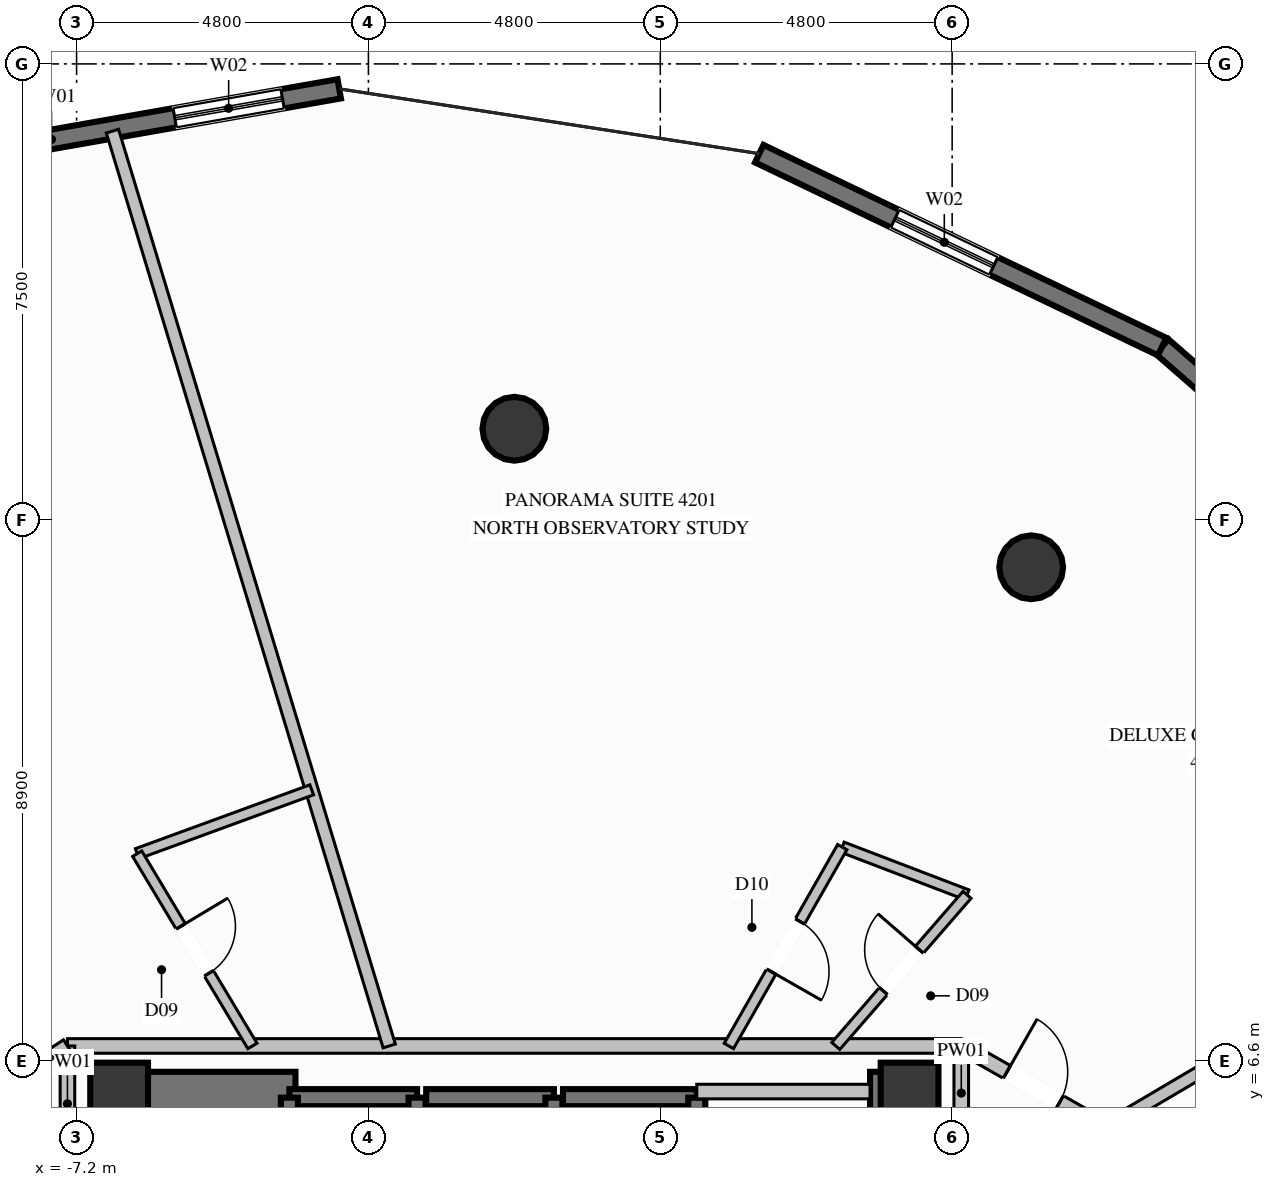
"""IFC4 building model, lengths in metres.
Left out: names, types, materials, properties, quantities, classifications, styles, units other than length and angle.
Written with IfcOpenShell. Run it as: python <this file> out.ifc"""

import sys

from ifc_helpers import new_model, si_unit, direction, frame, frame_2d, origin, origin_2d, place, context, subcontext, project, spatial, rectangle, circle, extrude, element, fill, save


model = new_model("IFC4")
c1 = context("Model", 3, precision=1e-05, world=origin(), true_north=direction((0.0, 1.0)))
c2 = subcontext(c1, "Body", "Model", "MODEL_VIEW")
j1 = project(units=[si_unit("LENGTHUNIT", "METRE"), si_unit("PLANEANGLEUNIT", "RADIAN")], contexts=[c1])
p1 = place(None, origin())
s1 = spatial("IfcSite", under=j1, at=p1, CompositionType="ELEMENT")
p2 = place(p1, origin())
s2 = spatial("IfcBuilding", under=s1, at=p2, CompositionType="ELEMENT")
p3 = place(p2, frame((0.0, 0.0, 156.6)))
s3 = spatial("IfcBuildingStorey", under=s2, at=p3, CompositionType="ELEMENT", Elevation=156.6)
for number, where, z_axis, x_axis in (
    (1, (6.5, 6.1, 0.0), (0.0, 0.0, 1.0), (1.0, 0.0, 0.0)),
    (2, (-6.5, 6.1, 0.0), (0.0, 0.0, 1.0), (1.0, 0.0, 0.0)),
):
    element("IfcColumn", number, at=place(p3, frame(where, z_axis=z_axis, x_axis=x_axis)), inside=s3, PredefinedType="COLUMN", context=c2, shape_type="SweptSolid", body=[
        extrude(rectangle(XDim=0.95, YDim=0.95, at=origin_2d()), origin(), (0.0, 0.0, 1.0), 3.6),
    ])
p4 = place(p3, frame((-6.175, 6.1, 0.0), z_axis=(0.0, 0.0, 1.0), x_axis=(1.0, 0.0, 0.0)))
e3 = element("IfcWall", 3, at=p4, inside=s3, PredefinedType="SHEAR", context=c2, shape_type="SweptSolid", body=[
    extrude(rectangle(XDim=2.575, YDim=0.65, at=frame_2d((1.288, 0.0))), origin(), (0.0, 0.0, 1.0), 3.6),
])
p5 = place(p3, frame((5.85, 6.1, 0.0), z_axis=(0.0, 0.0, 1.0), x_axis=(1.0, 0.0, 0.0)))
e4 = element("IfcWall", 4, at=p5, inside=s3, PredefinedType="SHEAR", context=c2, shape_type="SweptSolid", body=[
    extrude(rectangle(XDim=0.325, YDim=0.65, at=frame_2d((0.163, 0.0))), origin(), (0.0, 0.0, 1.0), 3.6),
])
p6 = place(p3, frame((-6.5, 2.35, 0.0), z_axis=(0.0, 0.0, 1.0), x_axis=(0.0, 1.0, 0.0)))
e5 = element("IfcWall", 5, at=p6, inside=s3, PredefinedType="SHEAR", context=c2, shape_type="SweptSolid", body=[
    extrude(rectangle(XDim=4.075, YDim=0.65, at=frame_2d((2.038, 0.0))), origin(), (0.0, 0.0, 1.0), 3.6),
])
p7 = place(p3, frame((6.5, 3.35, 0.0), z_axis=(0.0, 0.0, 1.0), x_axis=(0.0, 1.0, 0.0)))
e6 = element("IfcWall", 6, at=p7, inside=s3, PredefinedType="SHEAR", context=c2, shape_type="SweptSolid", body=[
    extrude(rectangle(XDim=3.075, YDim=0.65, at=frame_2d((1.538, 0.0))), origin(), (0.0, 0.0, 1.0), 3.6),
])
for number, where, z_axis, x_axis in (
    (7, (8.5, 14.722, 0.0), (0.0, 0.0, 1.0), (1.0, 0.0, 0.0)),
    (8, (0.0, 17.0, 0.0), (0.0, 0.0, 1.0), (1.0, 0.0, 0.0)),
):
    element("IfcColumn", number, at=place(p3, frame(where, z_axis=z_axis, x_axis=x_axis)), inside=s3, PredefinedType="COLUMN", context=c2, shape_type="SweptSolid", body=[
        extrude(circle(Radius=0.525, at=origin_2d()), origin(), (0.0, 0.0, 1.0), 3.6),
    ])
p8 = place(p3, frame((10.653, 18.351, 0.0), z_axis=(0.0, 0.0, 1.0), x_axis=(0.753498250632, -0.657449911624, 0.0)))
e9 = element("IfcWall", 9, at=p8, inside=s3, PredefinedType="SOLIDWALL", context=c2, shape_type="SweptSolid", body=[
    extrude(rectangle(XDim=7.56, YDim=0.32, at=frame_2d((3.78, 0.0))), origin(), (0.0, 0.0, 1.0), 3.35),
])
p9 = place(p8, frame((3.03, 0.0, 0.85)))
e10 = element("IfcOpeningElement", 10, at=p9, cuts=e9, PredefinedType="OPENING", context=c2, shape_type="SweptSolid", body=[
    extrude(rectangle(XDim=1.5, YDim=1.2, at=frame_2d((0.75, 0.6))), frame((0.0, 0.17, 0.0), z_axis=(0.0, -1.0, 0.0), x_axis=(1.0, 0.0, 0.0)), (0.0, 0.0, 1.0), 0.34),
])
p10 = place(p3, frame((4.028, 21.524, 0.0), z_axis=(0.0, 0.0, 1.0), x_axis=(0.901902357259, -0.431939970332, 0.0)))
e11 = element("IfcWall", 11, at=p10, inside=s3, PredefinedType="SOLIDWALL", context=c2, shape_type="SweptSolid", body=[
    extrude(rectangle(XDim=7.346, YDim=0.32, at=frame_2d((3.673, 0.0))), origin(), (0.0, 0.0, 1.0), 3.35),
])
p11 = place(p10, frame((2.474, 0.0, 0.35)))
e12 = element("IfcOpeningElement", 12, at=p11, cuts=e11, PredefinedType="OPENING", context=c2, shape_type="SweptSolid", body=[
    extrude(rectangle(XDim=1.8, YDim=2.6, at=frame_2d((0.9, 1.3))), frame((0.0, 0.17, 0.0), z_axis=(0.0, -1.0, 0.0), x_axis=(1.0, 0.0, 0.0)), (0.0, 0.0, 1.0), 0.34),
])
p12 = place(p3, frame((-9.393, 21.445, 0.0), z_axis=(0.0, 0.0, 1.0), x_axis=(0.984896334406, 0.173145056165, 0.0)))
e13 = element("IfcWall", 13, at=p12, inside=s3, PredefinedType="SOLIDWALL", context=c2, shape_type="SweptSolid", body=[
    extrude(rectangle(XDim=6.613, YDim=0.32, at=frame_2d((3.307, 0.0))), origin(), (0.0, 0.0, 1.0), 3.35),
])
p13 = place(p12, frame((3.866, 0.0, 0.35)))
e14 = element("IfcOpeningElement", 14, at=p13, cuts=e13, PredefinedType="OPENING", context=c2, shape_type="SweptSolid", body=[
    extrude(rectangle(XDim=1.8, YDim=2.6, at=frame_2d((0.9, 1.3))), frame((0.0, 0.17, 0.0), z_axis=(0.0, -1.0, 0.0), x_axis=(1.0, 0.0, 0.0)), (0.0, 0.0, 1.0), 0.34),
])
p14 = place(p3, frame((-1.6, 6.0, 0.0), z_axis=(0.0, 0.0, 1.0), x_axis=(-1.0, 0.0, 0.0)))
e15 = element("IfcWall", 15, at=p14, inside=s3, PredefinedType="SOLIDWALL", context=c2, shape_type="SweptSolid", body=[
    extrude(rectangle(XDim=2.1, YDim=0.28, at=frame_2d((1.05, 0.0))), origin(), (0.0, 0.0, 1.0), 3.35),
])
for number, where, z_axis, x_axis in (
    (16, (-3.7, 6.0, 0.0), (0.0, 0.0, 1.0), (0.0, -1.0, 0.0)),
    (17, (-1.6, 3.5, 0.0), (0.0, 0.0, 1.0), (0.0, 1.0, 0.0)),
):
    element("IfcWall", number, at=place(p3, frame(where, z_axis=z_axis, x_axis=x_axis)), inside=s3, PredefinedType="SOLIDWALL", context=c2, shape_type="SweptSolid", body=[
        extrude(rectangle(XDim=2.5, YDim=0.28, at=frame_2d((1.25, 0.0))), origin(), (0.0, 0.0, 1.0), 3.35),
    ])
p15 = place(p3, frame((0.65, 6.0, 0.0), z_axis=(0.0, 0.0, 1.0), x_axis=(-1.0, 0.0, 0.0)))
e18 = element("IfcWall", 18, at=p15, inside=s3, PredefinedType="SOLIDWALL", context=c2, shape_type="SweptSolid", body=[
    extrude(rectangle(XDim=2.1, YDim=0.28, at=frame_2d((1.05, 0.0))), origin(), (0.0, 0.0, 1.0), 3.35),
])
p16 = place(p3, frame((0.65, 3.5, 0.0), z_axis=(0.0, 0.0, 1.0), x_axis=(0.0, 1.0, 0.0)))
e19 = element("IfcWall", 19, at=p16, inside=s3, PredefinedType="SOLIDWALL", context=c2, shape_type="SweptSolid", body=[
    extrude(rectangle(XDim=2.5, YDim=0.28, at=frame_2d((1.25, 0.0))), origin(), (0.0, 0.0, 1.0), 3.35),
])
p17 = place(p3, frame((3.0, 6.0, 0.0), z_axis=(0.0, 0.0, 1.0), x_axis=(-1.0, 0.0, 0.0)))
e20 = element("IfcWall", 20, at=p17, inside=s3, PredefinedType="SOLIDWALL", context=c2, shape_type="SweptSolid", body=[
    extrude(rectangle(XDim=2.2, YDim=0.28, at=frame_2d((1.1, 0.0))), origin(), (0.0, 0.0, 1.0), 3.35),
])
p18 = place(p3, frame((3.0, 3.5, 0.0), z_axis=(0.0, 0.0, 1.0), x_axis=(0.0, 1.0, 0.0)))
e21 = element("IfcWall", 21, at=p18, inside=s3, PredefinedType="SOLIDWALL", context=c2, shape_type="SweptSolid", body=[
    extrude(rectangle(XDim=2.5, YDim=0.28, at=frame_2d((1.25, 0.0))), origin(), (0.0, 0.0, 1.0), 3.35),
])
p19 = place(p3, frame((-7.35, 6.85, 0.0), z_axis=(0.0, 0.0, 1.0), x_axis=(1.0, 0.0, 0.0)))
e22 = element("IfcWall", 22, at=p19, inside=s3, PredefinedType="PARTITIONING", context=c2, shape_type="SweptSolid", body=[
    extrude(rectangle(XDim=14.7, YDim=0.24, at=frame_2d((7.35, 0.0))), origin(), (0.0, 0.0, 1.0), 2.435),
])
p20 = place(p3, frame((-7.35, 4.95, 0.0), z_axis=(0.0, 0.0, 1.0), x_axis=(0.0, 1.0, 0.0)))
e23 = element("IfcWall", 23, at=p20, inside=s3, PredefinedType="PARTITIONING", context=c2, shape_type="SweptSolid", body=[
    extrude(rectangle(XDim=1.9, YDim=0.24, at=frame_2d((0.95, 0.0))), origin(), (0.0, 0.0, 1.0), 2.435),
])
p21 = place(p3, frame((7.35, 5.3, 0.0), z_axis=(0.0, 0.0, 1.0), x_axis=(0.0, 1.0, 0.0)))
e24 = element("IfcWall", 24, at=p21, inside=s3, PredefinedType="PARTITIONING", context=c2, shape_type="SweptSolid", body=[
    extrude(rectangle(XDim=1.55, YDim=0.24, at=frame_2d((0.775, 0.0))), origin(), (0.0, 0.0, 1.0), 2.435),
])
p22 = place(p3, frame((3.0, 6.1, 0.0), z_axis=(0.0, 0.0, 1.0), x_axis=(1.0, 0.0, 0.0)))
e25 = element("IfcWall", 25, at=p22, inside=s3, PredefinedType="PARTITIONING", context=c2, shape_type="SweptSolid", body=[
    extrude(rectangle(XDim=2.85, YDim=0.24, at=frame_2d((1.425, 0.0))), origin(), (0.0, 0.0, 1.0), 2.435),
])
p23 = place(p3, frame((9.72, 5.5, 0.0), z_axis=(0.0, 0.0, 1.0), x_axis=(0.861092827296, 0.508447777829, 0.0)))
e26 = element("IfcWall", 26, at=p23, inside=s3, PredefinedType="PARTITIONING", context=c2, shape_type="SweptSolid", body=[
    extrude(rectangle(XDim=5.289, YDim=0.21, at=frame_2d((2.644, 0.0))), origin(), (0.0, 0.0, 1.0), 2.717),
])
p24 = place(p3, frame((5.393, 10.12, 0.0), z_axis=(0.0, 0.0, 1.0), x_axis=(0.933965679014, -0.357362715492, 0.0)))
e27 = element("IfcWall", 27, at=p24, inside=s3, PredefinedType="PLUMBINGWALL", context=c2, shape_type="SweptSolid", body=[
    extrude(rectangle(XDim=2.197, YDim=0.175, at=frame_2d((1.099, 0.0))), origin(), (0.0, 0.0, 1.0), 3.35),
])
p25 = place(p3, frame((5.393, 10.12, 0.0), z_axis=(0.0, 0.0, 1.0), x_axis=(-0.495419387998, -0.868653918425, 0.0)))
e28 = element("IfcWall", 28, at=p25, inside=s3, PredefinedType="PLUMBINGWALL", context=c2, shape_type="SweptSolid", body=[
    extrude(rectangle(XDim=3.764, YDim=0.175, at=frame_2d((1.882, 0.0))), origin(), (0.0, 0.0, 1.0), 3.35),
])
p26 = place(p25, frame((1.407, 0.0, 0.0)))
e29 = element("IfcOpeningElement", 29, at=p26, cuts=e28, PredefinedType="OPENING", context=c2, shape_type="SweptSolid", body=[
    extrude(rectangle(XDim=0.95, YDim=2.1, at=frame_2d((0.475, 1.05))), frame((0.0, 0.098, 0.0), z_axis=(0.0, -1.0, 0.0), x_axis=(1.0, 0.0, 0.0)), (0.0, 0.0, 1.0), 0.195),
])
p27 = place(p3, frame((5.286, 6.85, 0.0), z_axis=(0.0, 0.0, 1.0), x_axis=(0.655906923774, 0.754841776365, 0.0)))
e30 = element("IfcWall", 30, at=p27, inside=s3, PredefinedType="PLUMBINGWALL", context=c2, shape_type="SweptSolid", body=[
    extrude(rectangle(XDim=3.292, YDim=0.175, at=frame_2d((1.646, 0.0))), origin(), (0.0, 0.0, 1.0), 2.717),
])
p28 = place(p27, frame((1.196, 0.0, 0.0)))
e31 = element("IfcOpeningElement", 31, at=p28, cuts=e30, PredefinedType="OPENING", context=c2, shape_type="SweptSolid", body=[
    extrude(rectangle(XDim=0.9, YDim=2.1, at=frame_2d((0.45, 1.05))), frame((0.0, 0.098, 0.0), z_axis=(0.0, -1.0, 0.0), x_axis=(1.0, 0.0, 0.0)), (0.0, 0.0, 1.0), 0.195),
])
p29 = place(p3, frame((7.35, 6.85, 0.0), z_axis=(0.0, 0.0, 1.0), x_axis=(0.868892391395, -0.495001022398, 0.0)))
e32 = element("IfcWall", 32, at=p29, inside=s3, PredefinedType="PARTITIONING", context=c2, shape_type="SweptSolid", body=[
    extrude(rectangle(XDim=2.728, YDim=0.24, at=frame_2d((1.364, 0.0))), origin(), (0.0, 0.0, 1.0), 3.35),
])
p30 = place(p29, frame((0.864, 0.0, 0.0)))
e33 = element("IfcOpeningElement", 33, at=p30, cuts=e32, PredefinedType="OPENING", context=c2, shape_type="SweptSolid", body=[
    extrude(rectangle(XDim=1.0, YDim=2.2, at=frame_2d((0.5, 1.1))), frame((0.0, 0.13, 0.0), z_axis=(0.0, -1.0, 0.0), x_axis=(1.0, 0.0, 0.0)), (0.0, 0.0, 1.0), 0.26),
])
p31 = place(p3, frame((-2.058, 6.85, 0.0), z_axis=(0.0, 0.0, 1.0), x_axis=(-0.289612905442, 0.957143858049, 0.0)))
e34 = element("IfcWall", 34, at=p31, inside=s3, PredefinedType="PARTITIONING", context=c2, shape_type="SweptSolid", body=[
    extrude(rectangle(XDim=15.718, YDim=0.21, at=frame_2d((7.859, 0.0))), origin(), (0.0, 0.0, 1.0), 3.35),
])
p32 = place(p3, frame((-6.203, 10.012, 0.0), z_axis=(0.0, 0.0, 1.0), x_axis=(0.939112792054, 0.343609027531, 0.0)))
e35 = element("IfcWall", 35, at=p32, inside=s3, PredefinedType="PLUMBINGWALL", context=c2, shape_type="SweptSolid", body=[
    extrude(rectangle(XDim=3.056, YDim=0.175, at=frame_2d((1.528, 0.0))), origin(), (0.0, 0.0, 1.0), 3.35),
])
p33 = place(p3, frame((-6.203, 10.012, 0.0), z_axis=(0.0, 0.0, 1.0), x_axis=(0.514028157497, -0.857773311138, 0.0)))
e36 = element("IfcWall", 36, at=p33, inside=s3, PredefinedType="PLUMBINGWALL", context=c2, shape_type="SweptSolid", body=[
    extrude(rectangle(XDim=3.686, YDim=0.175, at=frame_2d((1.843, 0.0))), origin(), (0.0, 0.0, 1.0), 3.35),
])
p34 = place(p33, frame((1.393, 0.0, 0.0)))
e37 = element("IfcOpeningElement", 37, at=p34, cuts=e36, PredefinedType="OPENING", context=c2, shape_type="SweptSolid", body=[
    extrude(rectangle(XDim=0.9, YDim=2.1, at=frame_2d((0.45, 1.05))), frame((0.0, 0.098, 0.0), z_axis=(0.0, -1.0, 0.0), x_axis=(1.0, 0.0, 0.0)), (0.0, 0.0, 1.0), 0.195),
])
p35 = place(p3, frame((-9.42, 5.5, 0.0), z_axis=(0.0, 0.0, 1.0), x_axis=(0.837571286912, 0.546328051029, 0.0)))
e38 = element("IfcWall", 38, at=p35, inside=s3, PredefinedType="PARTITIONING", context=c2, shape_type="SweptSolid", body=[
    extrude(rectangle(XDim=2.471, YDim=0.24, at=frame_2d((1.236, 0.0))), origin(), (0.0, 0.0, 1.0), 3.35),
])
p36 = place(p35, frame((0.736, 0.0, 0.0)))
e39 = element("IfcOpeningElement", 39, at=p36, cuts=e38, PredefinedType="OPENING", context=c2, shape_type="SweptSolid", body=[
    extrude(rectangle(XDim=1.0, YDim=2.2, at=frame_2d((0.5, 1.1))), frame((0.0, 0.13, 0.0), z_axis=(0.0, -1.0, 0.0), x_axis=(1.0, 0.0, 0.0)), (0.0, 0.0, 1.0), 0.26),
])
p37 = place(p11, origin())
e40 = element("IfcWindow", 40, at=p37, inside=s3, PartitioningType="SINGLE_PANEL", PredefinedType="WINDOW", context=c2, shape_type="SweptSolid", body=[
    extrude(rectangle(XDim=1.8, YDim=2.6, at=frame_2d((0.9, 1.3))), frame((0.0, 0.03, 0.0), z_axis=(0.0, -1.0, 0.0), x_axis=(1.0, 0.0, 0.0)), (0.0, 0.0, 1.0), 0.06),
])
fill(e12, e40)
p38 = place(p13, origin())
e41 = element("IfcWindow", 41, at=p38, inside=s3, PartitioningType="SINGLE_PANEL", PredefinedType="WINDOW", context=c2, shape_type="SweptSolid", body=[
    extrude(rectangle(XDim=1.8, YDim=2.6, at=frame_2d((0.9, 1.3))), frame((0.0, 0.03, 0.0), z_axis=(0.0, -1.0, 0.0), x_axis=(1.0, 0.0, 0.0)), (0.0, 0.0, 1.0), 0.06),
])
fill(e14, e41)
p39 = place(p28, origin())
e42 = element("IfcDoor", 42, at=p39, inside=s3, OperationType="SINGLE_SWING_RIGHT", PredefinedType="DOOR", context=c2, shape_type="SweptSolid", body=[
    extrude(rectangle(XDim=0.9, YDim=2.1, at=frame_2d((0.45, 1.05))), frame((0.0, 0.025, 0.0), z_axis=(0.0, -1.0, 0.0), x_axis=(1.0, 0.0, 0.0)), (0.0, 0.0, 1.0), 0.05),
])
fill(e31, e42)
p40 = place(p30, origin())
e43 = element("IfcDoor", 43, at=p40, inside=s3, OperationType="SINGLE_SWING_LEFT", PredefinedType="DOOR", context=c2, shape_type="SweptSolid", body=[
    extrude(rectangle(XDim=1.0, YDim=2.2, at=frame_2d((0.5, 1.1))), frame((0.0, 0.025, 0.0), z_axis=(0.0, -1.0, 0.0), x_axis=(1.0, 0.0, 0.0)), (0.0, 0.0, 1.0), 0.05),
])
fill(e33, e43)
p41 = place(p26, origin())
e44 = element("IfcDoor", 44, at=p41, inside=s3, OperationType="SINGLE_SWING_RIGHT", PredefinedType="DOOR", context=c2, shape_type="SweptSolid", body=[
    extrude(rectangle(XDim=0.95, YDim=2.1, at=frame_2d((0.475, 1.05))), frame((0.0, 0.025, 0.0), z_axis=(0.0, -1.0, 0.0), x_axis=(1.0, 0.0, 0.0)), (0.0, 0.0, 1.0), 0.05),
])
fill(e29, e44)
p42 = place(p34, origin())
e45 = element("IfcDoor", 45, at=p42, inside=s3, OperationType="SINGLE_SWING_LEFT", PredefinedType="DOOR", context=c2, shape_type="SweptSolid", body=[
    extrude(rectangle(XDim=0.9, YDim=2.1, at=frame_2d((0.45, 1.05))), frame((0.0, 0.025, 0.0), z_axis=(0.0, -1.0, 0.0), x_axis=(1.0, 0.0, 0.0)), (0.0, 0.0, 1.0), 0.05),
])
fill(e37, e45)
save(model, sys.argv[1])
